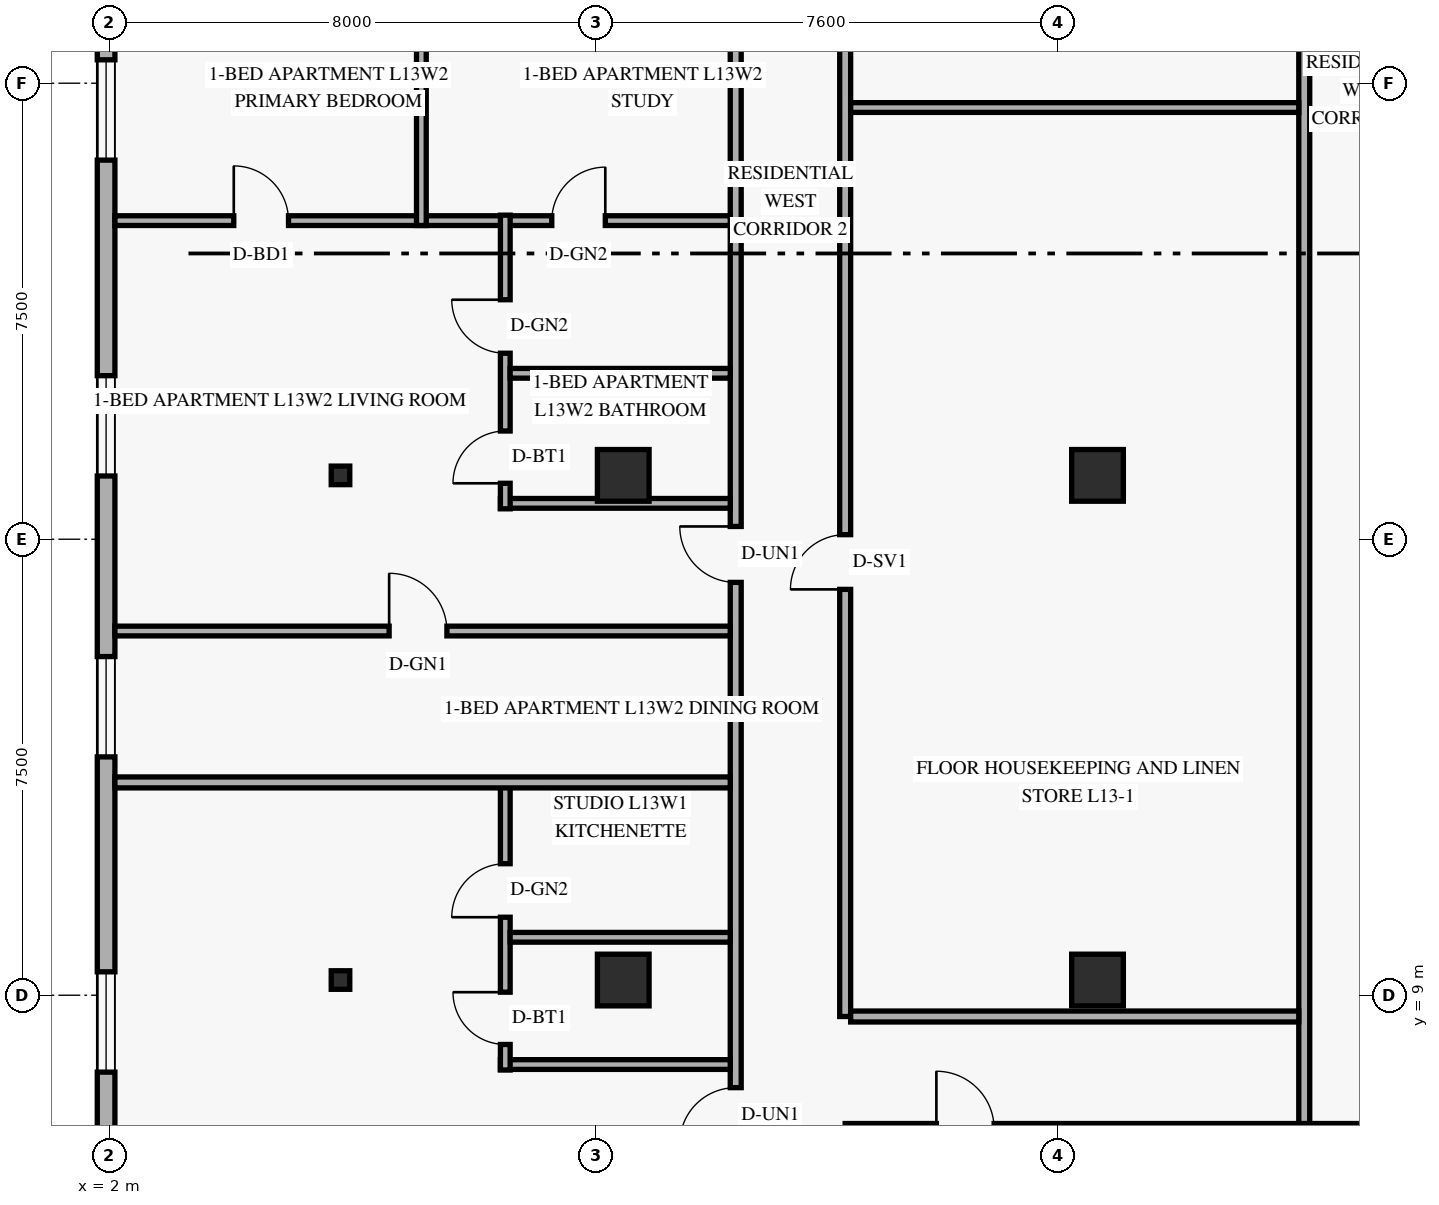
"""IFC4 building model, lengths in metres.
Left out: names, types, materials, properties, quantities, classifications, styles, units other than length and angle.
Written with IfcOpenShell. Run it as: python <this file> out.ifc"""

import sys

from ifc_helpers import new_model, si_unit, direction, frame, frame_2d, origin, origin_2d, place, context, subcontext, project, spatial, rectangle, hollow_rectangle, extrude, element, fill, save


model = new_model("IFC4")
c1 = context("Model", 3, precision=1e-05, world=origin(), true_north=direction((0.0, 1.0)))
c2 = subcontext(c1, "Body", "Model", "MODEL_VIEW")
j1 = project(units=[si_unit("LENGTHUNIT", "METRE"), si_unit("PLANEANGLEUNIT", "RADIAN")], contexts=[c1])
p1 = place(None, origin())
s1 = spatial("IfcSite", under=j1, at=p1, CompositionType="ELEMENT")
p2 = place(p1, origin())
s2 = spatial("IfcBuilding", under=s1, at=p2, CompositionType="ELEMENT")
p3 = place(p2, frame((0.0, 0.0, 52.8)))
s3 = spatial("IfcBuildingStorey", under=s2, at=p3, CompositionType="ELEMENT", Elevation=52.8)
for number, where, z_axis, x_axis in (
    (1, (5.8, 9.25, 0.0), (0.0, 0.0, 1.0), (1.0, 0.0, 0.0)),
    (2, (5.8, 17.55, 0.0), (0.0, 0.0, 1.0), (1.0, 0.0, 0.0)),
):
    element("IfcColumn", number, at=place(p3, frame(where, z_axis=z_axis, x_axis=x_axis)), inside=s3, PredefinedType="COLUMN", context=c2, shape_type="SweptSolid", body=[
        extrude(hollow_rectangle(XDim=0.305, YDim=0.305, WallThickness=0.013, at=origin_2d()), origin(), (0.0, 0.0, 1.0), 3.6),
    ])
for number, where, z_axis, x_axis in (
    (3, (10.45, 9.25, 0.0), (0.0, 0.0, 1.0), (1.0, 0.0, 0.0)),
    (4, (10.45, 17.55, 0.0), (0.0, 0.0, 1.0), (1.0, 0.0, 0.0)),
    (5, (18.25, 9.25, 0.0), (0.0, 0.0, 1.0), (1.0, 0.0, 0.0)),
    (6, (18.25, 17.55, 0.0), (0.0, 0.0, 1.0), (1.0, 0.0, 0.0)),
):
    element("IfcColumn", number, at=place(p3, frame(where, z_axis=z_axis, x_axis=x_axis)), inside=s3, PredefinedType="COLUMN", context=c2, shape_type="SweptSolid", body=[
        extrude(rectangle(XDim=0.85, YDim=0.85, at=origin_2d()), origin(), (0.0, 0.0, 1.0), 3.6),
    ])
p4 = place(p3, frame((1.945, 43.38, 0.0), z_axis=(0.0, 0.0, 1.0), x_axis=(0.0, -1.0, 0.0)))
e7 = element("IfcWall", 7, at=p4, inside=s3, PredefinedType="SOLIDWALL", context=c2, shape_type="SweptSolid", body=[
    extrude(rectangle(XDim=38.76, YDim=0.29, at=frame_2d((19.38, 0.0))), origin(), (0.0, 0.0, 1.0), 3.36),
])
p5 = place(p4, frame((33.995, 0.0, 0.85)))
e8 = element("IfcOpeningElement", 8, at=p5, cuts=e7, PredefinedType="OPENING", context=c2, shape_type="SweptSolid", body=[
    extrude(rectangle(XDim=1.65, YDim=1.6, at=frame_2d((0.825, 0.8))), frame((0.0, 0.155, 0.0), z_axis=(0.0, -1.0, 0.0), x_axis=(1.0, 0.0, 0.0)), (0.0, 0.0, 1.0), 0.31),
])
p6 = place(p4, frame((28.81, 0.0, 0.85)))
e9 = element("IfcOpeningElement", 9, at=p6, cuts=e7, PredefinedType="OPENING", context=c2, shape_type="SweptSolid", body=[
    extrude(rectangle(XDim=1.65, YDim=1.6, at=frame_2d((0.825, 0.8))), frame((0.0, 0.155, 0.0), z_axis=(0.0, -1.0, 0.0), x_axis=(1.0, 0.0, 0.0)), (0.0, 0.0, 1.0), 0.31),
])
p7 = place(p4, frame((24.19, 0.0, 0.85)))
e10 = element("IfcOpeningElement", 10, at=p7, cuts=e7, PredefinedType="OPENING", context=c2, shape_type="SweptSolid", body=[
    extrude(rectangle(XDim=1.65, YDim=1.6, at=frame_2d((0.825, 0.8))), frame((0.0, 0.155, 0.0), z_axis=(0.0, -1.0, 0.0), x_axis=(1.0, 0.0, 0.0)), (0.0, 0.0, 1.0), 0.31),
])
p8 = place(p4, frame((18.995, 0.0, 0.85)))
e11 = element("IfcOpeningElement", 11, at=p8, cuts=e7, PredefinedType="OPENING", context=c2, shape_type="SweptSolid", body=[
    extrude(rectangle(XDim=1.65, YDim=1.6, at=frame_2d((0.825, 0.8))), frame((0.0, 0.155, 0.0), z_axis=(0.0, -1.0, 0.0), x_axis=(1.0, 0.0, 0.0)), (0.0, 0.0, 1.0), 0.31),
])
p9 = place(p4, frame((13.19, 0.0, 0.85)))
e12 = element("IfcOpeningElement", 12, at=p9, cuts=e7, PredefinedType="OPENING", context=c2, shape_type="SweptSolid", body=[
    extrude(rectangle(XDim=1.65, YDim=1.6, at=frame_2d((0.825, 0.8))), frame((0.0, 0.155, 0.0), z_axis=(0.0, -1.0, 0.0), x_axis=(1.0, 0.0, 0.0)), (0.0, 0.0, 1.0), 0.31),
])
p10 = place(p4, frame((7.21, 0.0, 0.85)))
e13 = element("IfcOpeningElement", 13, at=p10, cuts=e7, PredefinedType="OPENING", context=c2, shape_type="SweptSolid", body=[
    extrude(rectangle(XDim=1.65, YDim=1.6, at=frame_2d((0.825, 0.8))), frame((0.0, 0.155, 0.0), z_axis=(0.0, -1.0, 0.0), x_axis=(1.0, 0.0, 0.0)), (0.0, 0.0, 1.0), 0.31),
])
p11 = place(p4, frame((2.195, 0.0, 0.85)))
e14 = element("IfcOpeningElement", 14, at=p11, cuts=e7, PredefinedType="OPENING", context=c2, shape_type="SweptSolid", body=[
    extrude(rectangle(XDim=1.65, YDim=1.6, at=frame_2d((0.825, 0.8))), frame((0.0, 0.155, 0.0), z_axis=(0.0, -1.0, 0.0), x_axis=(1.0, 0.0, 0.0)), (0.0, 0.0, 1.0), 0.31),
])
p12 = place(p3, frame((21.65, 6.8, 0.0), z_axis=(0.0, 0.0, 1.0), x_axis=(0.0, 1.0, 0.0)))
e15 = element("IfcWall", 15, at=p12, inside=s3, PredefinedType="STANDARD", context=c2, shape_type="SweptSolid", body=[
    extrude(rectangle(XDim=34.4, YDim=0.18, at=frame_2d((17.2, 0.0))), origin(), (0.0, 0.0, 1.0), 2.649),
])
p13 = place(p3, frame((14.1, 6.8, 0.0), z_axis=(0.0, 0.0, 1.0), x_axis=(1.0, 0.0, 0.0)))
e16 = element("IfcWall", 16, at=p13, inside=s3, PredefinedType="STANDARD", context=c2, shape_type="SweptSolid", body=[
    extrude(rectangle(XDim=21.32, YDim=0.18, at=frame_2d((10.66, 0.0))), origin(), (0.0, 0.0, 1.0), 2.649),
])
p14 = place(p13, frame((1.5, 0.0, 0.0)))
e17 = element("IfcOpeningElement", 17, at=p14, cuts=e16, PredefinedType="OPENING", context=c2, shape_type="SweptSolid", body=[
    extrude(rectangle(XDim=0.95, YDim=2.15, at=frame_2d((0.475, 1.075))), frame((0.0, 0.1, 0.0), z_axis=(0.0, -1.0, 0.0), x_axis=(1.0, 0.0, 0.0)), (0.0, 0.0, 1.0), 0.2),
])
p15 = place(p13, frame((10.625, 0.0, 0.0)))
e18 = element("IfcOpeningElement", 18, at=p15, cuts=e16, PredefinedType="OPENING", context=c2, shape_type="SweptSolid", body=[
    extrude(rectangle(XDim=0.92, YDim=2.15, at=frame_2d((0.46, 1.075))), frame((0.0, 0.1, 0.0), z_axis=(0.0, -1.0, 0.0), x_axis=(1.0, 0.0, 0.0)), (0.0, 0.0, 1.0), 0.2),
])
p16 = place(p3, frame((12.3, 1.29, 0.0), z_axis=(0.0, 0.0, 1.0), x_axis=(0.0, 1.0, 0.0)))
e19 = element("IfcWall", 19, at=p16, inside=s3, PredefinedType="STANDARD", context=c2, shape_type="SweptSolid", body=[
    extrude(rectangle(XDim=45.42, YDim=0.18, at=frame_2d((22.71, 0.0))), origin(), (0.0, 0.0, 1.0), 2.649),
])
p17 = place(p16, frame((5.27, 0.0, 0.0)))
e20 = element("IfcOpeningElement", 20, at=p17, cuts=e19, PredefinedType="OPENING", context=c2, shape_type="SweptSolid", body=[
    extrude(rectangle(XDim=0.92, YDim=2.15, at=frame_2d((0.46, 1.075))), frame((0.0, 0.1, 0.0), z_axis=(0.0, -1.0, 0.0), x_axis=(1.0, 0.0, 0.0)), (0.0, 0.0, 1.0), 0.2),
])
p18 = place(p16, frame((14.5, 0.0, 0.0)))
e21 = element("IfcOpeningElement", 21, at=p18, cuts=e19, PredefinedType="OPENING", context=c2, shape_type="SweptSolid", body=[
    extrude(rectangle(XDim=0.92, YDim=2.15, at=frame_2d((0.46, 1.075))), frame((0.0, 0.1, 0.0), z_axis=(0.0, -1.0, 0.0), x_axis=(1.0, 0.0, 0.0)), (0.0, 0.0, 1.0), 0.2),
])
p19 = place(p16, frame((26.082, 0.0, 0.0)))
e22 = element("IfcOpeningElement", 22, at=p19, cuts=e19, PredefinedType="OPENING", context=c2, shape_type="SweptSolid", body=[
    extrude(rectangle(XDim=0.92, YDim=2.15, at=frame_2d((0.46, 1.075))), frame((0.0, 0.1, 0.0), z_axis=(0.0, -1.0, 0.0), x_axis=(1.0, 0.0, 0.0)), (0.0, 0.0, 1.0), 0.2),
])
p20 = place(p16, frame((41.05, 0.0, 0.0)))
e23 = element("IfcOpeningElement", 23, at=p20, cuts=e19, PredefinedType="OPENING", context=c2, shape_type="SweptSolid", body=[
    extrude(rectangle(XDim=0.92, YDim=2.15, at=frame_2d((0.46, 1.075))), frame((0.0, 0.1, 0.0), z_axis=(0.0, -1.0, 0.0), x_axis=(1.0, 0.0, 0.0)), (0.0, 0.0, 1.0), 0.2),
])
p21 = place(p3, frame((14.1, 8.65, 0.0), z_axis=(0.0, 0.0, 1.0), x_axis=(0.0, 1.0, 0.0)))
e24 = element("IfcWall", 24, at=p21, inside=s3, PredefinedType="STANDARD", context=c2, shape_type="SweptSolid", body=[
    extrude(rectangle(XDim=30.7, YDim=0.18, at=frame_2d((15.35, 0.0))), origin(), (0.0, 0.0, 1.0), 2.649),
])
p22 = place(p21, frame((7.025, 0.0, 0.0)))
e25 = element("IfcOpeningElement", 25, at=p22, cuts=e24, PredefinedType="OPENING", context=c2, shape_type="SweptSolid", body=[
    extrude(rectangle(XDim=0.9, YDim=2.1, at=frame_2d((0.45, 1.05))), frame((0.0, 0.1, 0.0), z_axis=(0.0, -1.0, 0.0), x_axis=(1.0, 0.0, 0.0)), (0.0, 0.0, 1.0), 0.2),
])
p23 = place(p21, frame((22.375, 0.0, 0.0)))
e26 = element("IfcOpeningElement", 26, at=p23, cuts=e24, PredefinedType="OPENING", context=c2, shape_type="SweptSolid", body=[
    extrude(rectangle(XDim=0.9, YDim=2.1, at=frame_2d((0.45, 1.05))), frame((0.0, 0.1, 0.0), z_axis=(0.0, -1.0, 0.0), x_axis=(1.0, 0.0, 0.0)), (0.0, 0.0, 1.0), 0.2),
])
p24 = place(p3, frame((14.19, 8.65, 0.0), z_axis=(0.0, 0.0, 1.0), x_axis=(1.0, 0.0, 0.0)))
e27 = element("IfcWall", 27, at=p24, inside=s3, PredefinedType="STANDARD", context=c2, shape_type="SweptSolid", body=[
    extrude(rectangle(XDim=7.37, YDim=0.18, at=frame_2d((3.685, 0.0))), origin(), (0.0, 0.0, 1.0), 2.649),
])
p25 = place(p3, frame((8.43, 7.86, 0.0), z_axis=(0.0, 0.0, 1.0), x_axis=(1.0, 0.0, 0.0)))
e28 = element("IfcWall", 28, at=p25, inside=s3, PredefinedType="PLUMBINGWALL", context=c2, shape_type="SweptSolid", body=[
    extrude(rectangle(XDim=3.78, YDim=0.16, at=frame_2d((1.89, 0.0))), origin(), (0.0, 0.0, 1.0), 2.649),
])
p26 = place(p3, frame((8.51, 7.77, 0.0), z_axis=(0.0, 0.0, 1.0), x_axis=(0.0, 1.0, 0.0)))
e29 = element("IfcWall", 29, at=p26, inside=s3, PredefinedType="PLUMBINGWALL", context=c2, shape_type="SweptSolid", body=[
    extrude(rectangle(XDim=4.73, YDim=0.16, at=frame_2d((2.365, 0.0))), origin(), (0.0, 0.0, 1.0), 2.649),
])
p27 = place(p26, frame((0.42, 0.0, 0.0)))
e30 = element("IfcOpeningElement", 30, at=p27, cuts=e29, PredefinedType="OPENING", context=c2, shape_type="SweptSolid", body=[
    extrude(rectangle(XDim=0.86, YDim=2.12, at=frame_2d((0.43, 1.06))), frame((0.0, 0.09, 0.0), z_axis=(0.0, -1.0, 0.0), x_axis=(1.0, 0.0, 0.0)), (0.0, 0.0, 1.0), 0.18),
])
p28 = place(p26, frame((2.513, 0.0, 0.0)))
e31 = element("IfcOpeningElement", 31, at=p28, cuts=e29, PredefinedType="OPENING", context=c2, shape_type="SweptSolid", body=[
    extrude(rectangle(XDim=0.88, YDim=2.12, at=frame_2d((0.44, 1.06))), frame((0.0, 0.09, 0.0), z_axis=(0.0, -1.0, 0.0), x_axis=(1.0, 0.0, 0.0)), (0.0, 0.0, 1.0), 0.18),
])
p29 = place(p3, frame((8.59, 9.953, 0.0), z_axis=(0.0, 0.0, 1.0), x_axis=(1.0, 0.0, 0.0)))
e32 = element("IfcWall", 32, at=p29, inside=s3, PredefinedType="PLUMBINGWALL", context=c2, shape_type="SweptSolid", body=[
    extrude(rectangle(XDim=3.62, YDim=0.16, at=frame_2d((1.81, 0.0))), origin(), (0.0, 0.0, 1.0), 2.649),
])
p30 = place(p3, frame((2.09, 12.5, 0.0), z_axis=(0.0, 0.0, 1.0), x_axis=(1.0, 0.0, 0.0)))
e33 = element("IfcWall", 33, at=p30, inside=s3, PredefinedType="PARTITIONING", context=c2, shape_type="SweptSolid", body=[
    extrude(rectangle(XDim=10.12, YDim=0.18, at=frame_2d((5.06, 0.0))), origin(), (0.0, 0.0, 1.0), 2.649),
])
p31 = place(p3, frame((2.09, 21.74, 0.0), z_axis=(0.0, 0.0, 1.0), x_axis=(1.0, 0.0, 0.0)))
e34 = element("IfcWall", 34, at=p31, inside=s3, PredefinedType="PARTITIONING", context=c2, shape_type="SweptSolid", body=[
    extrude(rectangle(XDim=10.12, YDim=0.16, at=frame_2d((5.06, 0.0))), origin(), (0.0, 0.0, 1.0), 2.649),
])
p32 = place(p31, frame((7.185, 0.0, 0.0)))
e35 = element("IfcOpeningElement", 35, at=p32, cuts=e34, PredefinedType="OPENING", context=c2, shape_type="SweptSolid", body=[
    extrude(rectangle(XDim=0.88, YDim=2.12, at=frame_2d((0.44, 1.06))), frame((0.0, 0.09, 0.0), z_axis=(0.0, -1.0, 0.0), x_axis=(1.0, 0.0, 0.0)), (0.0, 0.0, 1.0), 0.18),
])
p33 = place(p31, frame((1.955, 0.0, 0.0)))
e36 = element("IfcOpeningElement", 36, at=p33, cuts=e34, PredefinedType="OPENING", context=c2, shape_type="SweptSolid", body=[
    extrude(rectangle(XDim=0.9, YDim=2.14, at=frame_2d((0.45, 1.07))), frame((0.0, 0.09, 0.0), z_axis=(0.0, -1.0, 0.0), x_axis=(1.0, 0.0, 0.0)), (0.0, 0.0, 1.0), 0.18),
])
p34 = place(p3, frame((8.43, 17.09, 0.0), z_axis=(0.0, 0.0, 1.0), x_axis=(1.0, 0.0, 0.0)))
e37 = element("IfcWall", 37, at=p34, inside=s3, PredefinedType="PLUMBINGWALL", context=c2, shape_type="SweptSolid", body=[
    extrude(rectangle(XDim=3.78, YDim=0.16, at=frame_2d((1.89, 0.0))), origin(), (0.0, 0.0, 1.0), 2.649),
])
p35 = place(p3, frame((8.51, 17.0, 0.0), z_axis=(0.0, 0.0, 1.0), x_axis=(0.0, 1.0, 0.0)))
e38 = element("IfcWall", 38, at=p35, inside=s3, PredefinedType="PLUMBINGWALL", context=c2, shape_type="SweptSolid", body=[
    extrude(rectangle(XDim=4.83, YDim=0.16, at=frame_2d((2.415, 0.0))), origin(), (0.0, 0.0, 1.0), 2.649),
])
p36 = place(p35, frame((0.42, 0.0, 0.0)))
e39 = element("IfcOpeningElement", 39, at=p36, cuts=e38, PredefinedType="OPENING", context=c2, shape_type="SweptSolid", body=[
    extrude(rectangle(XDim=0.86, YDim=2.12, at=frame_2d((0.43, 1.06))), frame((0.0, 0.09, 0.0), z_axis=(0.0, -1.0, 0.0), x_axis=(1.0, 0.0, 0.0)), (0.0, 0.0, 1.0), 0.18),
])
p37 = place(p35, frame((2.559, 0.0, 0.0)))
e40 = element("IfcOpeningElement", 40, at=p37, cuts=e38, PredefinedType="OPENING", context=c2, shape_type="SweptSolid", body=[
    extrude(rectangle(XDim=0.88, YDim=2.12, at=frame_2d((0.44, 1.06))), frame((0.0, 0.09, 0.0), z_axis=(0.0, -1.0, 0.0), x_axis=(1.0, 0.0, 0.0)), (0.0, 0.0, 1.0), 0.18),
])
p38 = place(p3, frame((8.59, 19.229, 0.0), z_axis=(0.0, 0.0, 1.0), x_axis=(1.0, 0.0, 0.0)))
e41 = element("IfcWall", 41, at=p38, inside=s3, PredefinedType="PLUMBINGWALL", context=c2, shape_type="SweptSolid", body=[
    extrude(rectangle(XDim=3.62, YDim=0.16, at=frame_2d((1.81, 0.0))), origin(), (0.0, 0.0, 1.0), 2.649),
])
p39 = place(p3, frame((2.09, 14.99, 0.0), z_axis=(0.0, 0.0, 1.0), x_axis=(1.0, 0.0, 0.0)))
e42 = element("IfcWall", 42, at=p39, inside=s3, PredefinedType="PARTITIONING", context=c2, shape_type="SweptSolid", body=[
    extrude(rectangle(XDim=10.12, YDim=0.16, at=frame_2d((5.06, 0.0))), origin(), (0.0, 0.0, 1.0), 2.649),
])
p40 = place(p39, frame((4.51, 0.0, 0.0)))
e43 = element("IfcOpeningElement", 43, at=p40, cuts=e42, PredefinedType="OPENING", context=c2, shape_type="SweptSolid", body=[
    extrude(rectangle(XDim=0.95, YDim=2.15, at=frame_2d((0.475, 1.075))), frame((0.0, 0.09, 0.0), z_axis=(0.0, -1.0, 0.0), x_axis=(1.0, 0.0, 0.0)), (0.0, 0.0, 1.0), 0.18),
])
p41 = place(p3, frame((7.13, 21.66, 0.0), z_axis=(0.0, 0.0, 1.0), x_axis=(0.0, 1.0, 0.0)))
e44 = element("IfcWall", 44, at=p41, inside=s3, PredefinedType="PARTITIONING", context=c2, shape_type="SweptSolid", body=[
    extrude(rectangle(XDim=4.11, YDim=0.16, at=frame_2d((2.055, 0.0))), origin(), (0.0, 0.0, 1.0), 3.36),
])
p42 = place(p3, frame((14.19, 23.6, 0.0), z_axis=(0.0, 0.0, 1.0), x_axis=(1.0, 0.0, 0.0)))
e45 = element("IfcWall", 45, at=p42, inside=s3, PredefinedType="PARTITIONING", context=c2, shape_type="SweptSolid", body=[
    extrude(rectangle(XDim=7.37, YDim=0.16, at=frame_2d((3.685, 0.0))), origin(), (0.0, 0.0, 1.0), 2.649),
])
p43 = place(p5, origin())
e46 = element("IfcWindow", 46, at=p43, inside=s3, PartitioningType="SINGLE_PANEL", PredefinedType="WINDOW", context=c2, shape_type="SweptSolid", body=[
    extrude(rectangle(XDim=1.65, YDim=1.6, at=frame_2d((0.825, 0.8))), frame((0.0, 0.03, 0.0), z_axis=(0.0, -1.0, 0.0), x_axis=(1.0, 0.0, 0.0)), (0.0, 0.0, 1.0), 0.06),
])
fill(e8, e46)
p44 = place(p6, origin())
e47 = element("IfcWindow", 47, at=p44, inside=s3, PartitioningType="SINGLE_PANEL", PredefinedType="WINDOW", context=c2, shape_type="SweptSolid", body=[
    extrude(rectangle(XDim=1.65, YDim=1.6, at=frame_2d((0.825, 0.8))), frame((0.0, 0.03, 0.0), z_axis=(0.0, -1.0, 0.0), x_axis=(1.0, 0.0, 0.0)), (0.0, 0.0, 1.0), 0.06),
])
fill(e9, e47)
p45 = place(p7, origin())
e48 = element("IfcWindow", 48, at=p45, inside=s3, PartitioningType="SINGLE_PANEL", PredefinedType="WINDOW", context=c2, shape_type="SweptSolid", body=[
    extrude(rectangle(XDim=1.65, YDim=1.6, at=frame_2d((0.825, 0.8))), frame((0.0, 0.03, 0.0), z_axis=(0.0, -1.0, 0.0), x_axis=(1.0, 0.0, 0.0)), (0.0, 0.0, 1.0), 0.06),
])
fill(e10, e48)
p46 = place(p8, origin())
e49 = element("IfcWindow", 49, at=p46, inside=s3, PartitioningType="SINGLE_PANEL", PredefinedType="WINDOW", context=c2, shape_type="SweptSolid", body=[
    extrude(rectangle(XDim=1.65, YDim=1.6, at=frame_2d((0.825, 0.8))), frame((0.0, 0.03, 0.0), z_axis=(0.0, -1.0, 0.0), x_axis=(1.0, 0.0, 0.0)), (0.0, 0.0, 1.0), 0.06),
])
fill(e11, e49)
p47 = place(p17, origin())
e50 = element("IfcDoor", 50, at=p47, inside=s3, OperationType="SINGLE_SWING_LEFT", PredefinedType="DOOR", context=c2, shape_type="SweptSolid", body=[
    extrude(rectangle(XDim=0.92, YDim=2.15, at=frame_2d((0.46, 1.075))), frame((0.0, 0.025, 0.0), z_axis=(0.0, -1.0, 0.0), x_axis=(1.0, 0.0, 0.0)), (0.0, 0.0, 1.0), 0.05),
])
fill(e20, e50)
p48 = place(p27, origin())
e51 = element("IfcDoor", 51, at=p48, inside=s3, OperationType="SINGLE_SWING_RIGHT", PredefinedType="DOOR", context=c2, shape_type="SweptSolid", body=[
    extrude(rectangle(XDim=0.86, YDim=2.12, at=frame_2d((0.43, 1.06))), frame((0.0, 0.025, 0.0), z_axis=(0.0, -1.0, 0.0), x_axis=(1.0, 0.0, 0.0)), (0.0, 0.0, 1.0), 0.05),
])
fill(e30, e51)
p49 = place(p28, origin())
e52 = element("IfcDoor", 52, at=p49, inside=s3, OperationType="SINGLE_SWING_LEFT", PredefinedType="DOOR", context=c2, shape_type="SweptSolid", body=[
    extrude(rectangle(XDim=0.88, YDim=2.12, at=frame_2d((0.44, 1.06))), frame((0.0, 0.025, 0.0), z_axis=(0.0, -1.0, 0.0), x_axis=(1.0, 0.0, 0.0)), (0.0, 0.0, 1.0), 0.05),
])
fill(e31, e52)
p50 = place(p40, origin())
e53 = element("IfcDoor", 53, at=p50, inside=s3, OperationType="SINGLE_SWING_LEFT", PredefinedType="DOOR", context=c2, shape_type="SweptSolid", body=[
    extrude(rectangle(XDim=0.95, YDim=2.15, at=frame_2d((0.475, 1.075))), frame((0.0, 0.025, 0.0), z_axis=(0.0, -1.0, 0.0), x_axis=(1.0, 0.0, 0.0)), (0.0, 0.0, 1.0), 0.05),
])
fill(e43, e53)
p51 = place(p18, origin())
e54 = element("IfcDoor", 54, at=p51, inside=s3, OperationType="SINGLE_SWING_RIGHT", PredefinedType="DOOR", context=c2, shape_type="SweptSolid", body=[
    extrude(rectangle(XDim=0.92, YDim=2.15, at=frame_2d((0.46, 1.075))), frame((0.0, 0.025, 0.0), z_axis=(0.0, -1.0, 0.0), x_axis=(1.0, 0.0, 0.0)), (0.0, 0.0, 1.0), 0.05),
])
fill(e21, e54)
p52 = place(p36, origin())
e55 = element("IfcDoor", 55, at=p52, inside=s3, OperationType="SINGLE_SWING_LEFT", PredefinedType="DOOR", context=c2, shape_type="SweptSolid", body=[
    extrude(rectangle(XDim=0.86, YDim=2.12, at=frame_2d((0.43, 1.06))), frame((0.0, 0.025, 0.0), z_axis=(0.0, -1.0, 0.0), x_axis=(1.0, 0.0, 0.0)), (0.0, 0.0, 1.0), 0.05),
])
fill(e39, e55)
p53 = place(p37, origin())
e56 = element("IfcDoor", 56, at=p53, inside=s3, OperationType="SINGLE_SWING_RIGHT", PredefinedType="DOOR", context=c2, shape_type="SweptSolid", body=[
    extrude(rectangle(XDim=0.88, YDim=2.12, at=frame_2d((0.44, 1.06))), frame((0.0, 0.025, 0.0), z_axis=(0.0, -1.0, 0.0), x_axis=(1.0, 0.0, 0.0)), (0.0, 0.0, 1.0), 0.05),
])
fill(e40, e56)
p54 = place(p32, origin())
e57 = element("IfcDoor", 57, at=p54, inside=s3, OperationType="SINGLE_SWING_RIGHT", PredefinedType="DOOR", context=c2, shape_type="SweptSolid", body=[
    extrude(rectangle(XDim=0.88, YDim=2.12, at=frame_2d((0.44, 1.06))), frame((0.0, 0.025, 0.0), z_axis=(0.0, -1.0, 0.0), x_axis=(1.0, 0.0, 0.0)), (0.0, 0.0, 1.0), 0.05),
])
fill(e35, e57)
p55 = place(p33, origin())
e58 = element("IfcDoor", 58, at=p55, inside=s3, OperationType="SINGLE_SWING_LEFT", PredefinedType="DOOR", context=c2, shape_type="SweptSolid", body=[
    extrude(rectangle(XDim=0.9, YDim=2.14, at=frame_2d((0.45, 1.07))), frame((0.0, 0.025, 0.0), z_axis=(0.0, -1.0, 0.0), x_axis=(1.0, 0.0, 0.0)), (0.0, 0.0, 1.0), 0.05),
])
fill(e36, e58)
p56 = place(p22, origin())
e59 = element("IfcDoor", 59, at=p56, inside=s3, OperationType="SINGLE_SWING_LEFT", PredefinedType="DOOR", context=c2, shape_type="SweptSolid", body=[
    extrude(rectangle(XDim=0.9, YDim=2.1, at=frame_2d((0.45, 1.05))), frame((0.0, 0.025, 0.0), z_axis=(0.0, -1.0, 0.0), x_axis=(1.0, 0.0, 0.0)), (0.0, 0.0, 1.0), 0.05),
])
fill(e25, e59)
save(model, sys.argv[1])
